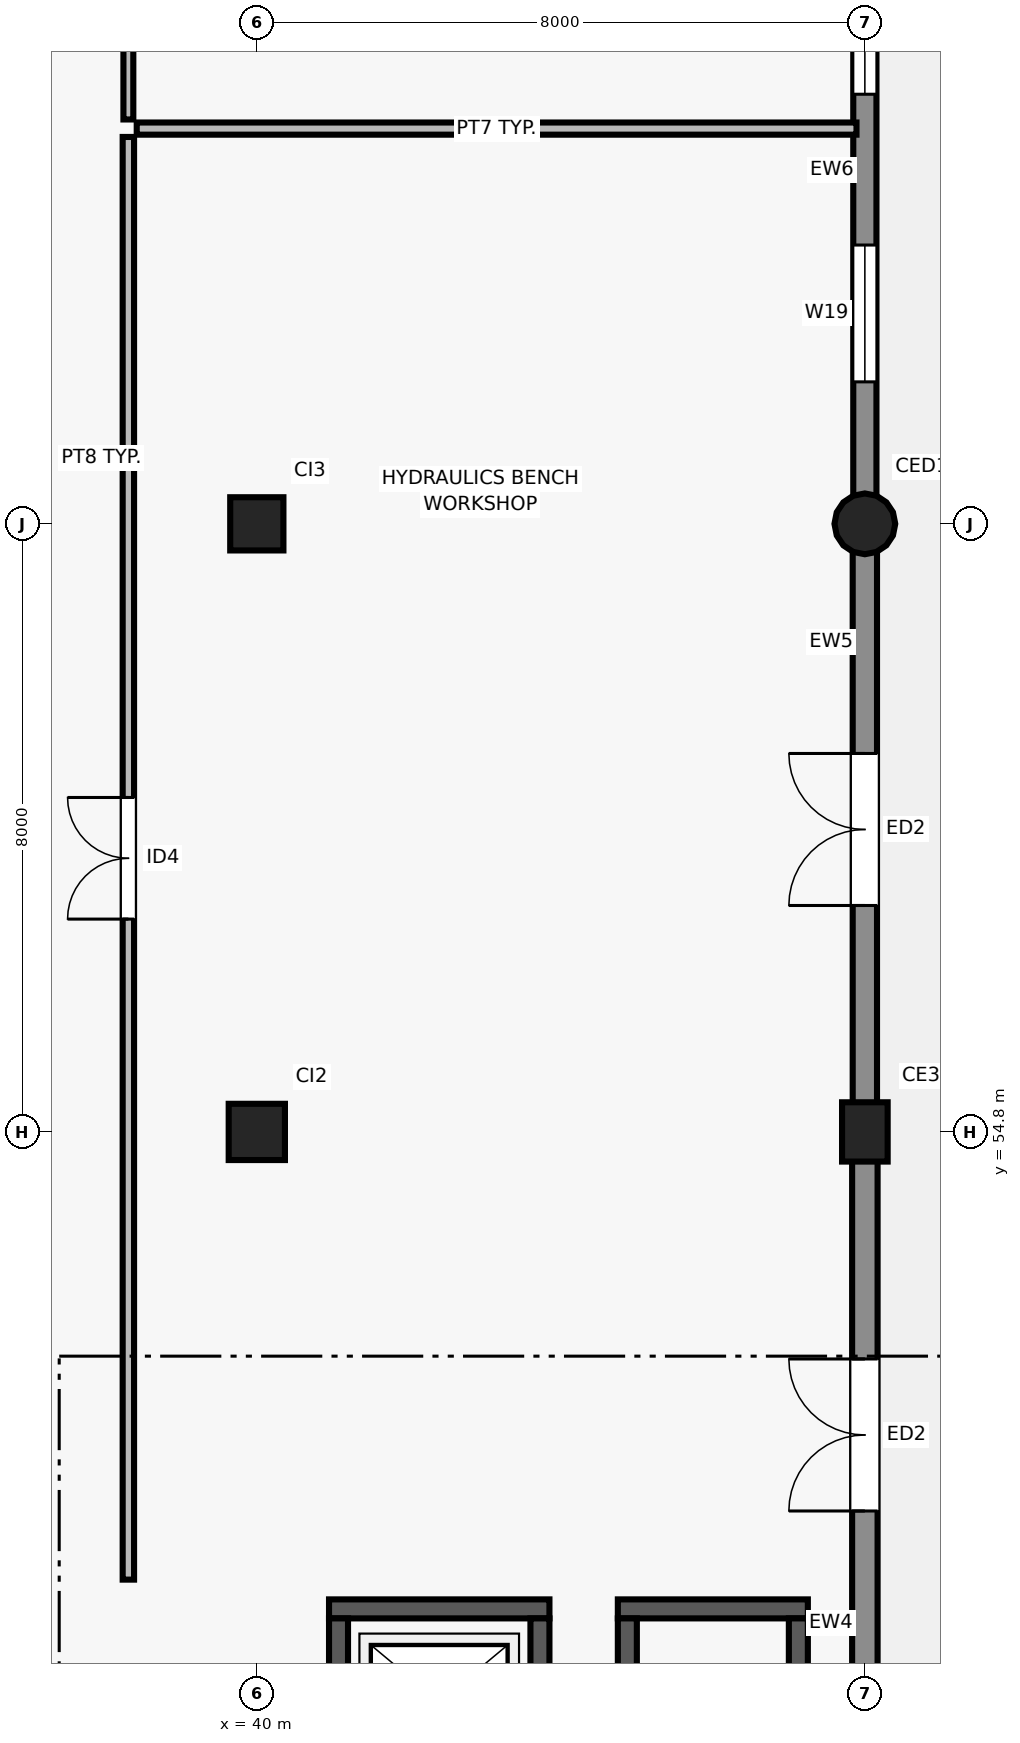
"""IFC4 building model, lengths in metres.
Left out: names, types, materials, properties, quantities, classifications, styles, units other than length and angle.
Written with IfcOpenShell. Run it as: python <this file> out.ifc"""

import sys

from ifc_helpers import new_model, si_unit, direction, frame, frame_2d, origin, origin_2d, place, context, subcontext, project, spatial, rectangle, circle, extrude, element, fill, save


model = new_model("IFC4")
c1 = context("Model", 3, precision=1e-05, world=origin(), true_north=direction((0.0, 1.0)))
c2 = subcontext(c1, "Body", "Model", "MODEL_VIEW")
j1 = project(units=[si_unit("LENGTHUNIT", "METRE"), si_unit("PLANEANGLEUNIT", "RADIAN")], contexts=[c1])
p1 = place(None, origin())
s1 = spatial("IfcSite", under=j1, at=p1, CompositionType="ELEMENT")
p2 = place(p1, origin())
s2 = spatial("IfcBuilding", under=s1, at=p2, CompositionType="ELEMENT")
p3 = place(p2, origin())
s3 = spatial("IfcBuildingStorey", under=s2, at=p3, CompositionType="ELEMENT", Elevation=0.0)
p4 = place(p3, frame((40.0, 54.8, 0.0), z_axis=(0.0, 0.0, 1.0), x_axis=(1.0, 0.0, 0.0)))
e1 = element("IfcColumn", 1, at=p4, inside=s3, PredefinedType="COLUMN", context=c2, shape_type="SweptSolid", body=[
    extrude(rectangle(XDim=0.74, YDim=0.74, at=origin_2d()), origin(), (0.0, 0.0, 1.0), 4.5),
])
p5 = place(p3, frame((40.0, 62.8, 0.0), z_axis=(0.0, 0.0, 1.0), x_axis=(1.0, 0.0, 0.0)))
e2 = element("IfcColumn", 2, at=p5, inside=s3, PredefinedType="COLUMN", context=c2, shape_type="SweptSolid", body=[
    extrude(rectangle(XDim=0.7, YDim=0.7, at=origin_2d()), origin(), (0.0, 0.0, 1.0), 4.5),
])
p6 = place(p3, frame((48.0, 54.8, 0.0), z_axis=(0.0, 0.0, 1.0), x_axis=(1.0, 0.0, 0.0)))
e3 = element("IfcColumn", 3, at=p6, inside=s3, PredefinedType="COLUMN", context=c2, shape_type="SweptSolid", body=[
    extrude(rectangle(XDim=0.78, YDim=0.6, at=origin_2d()), origin(), (0.0, 0.0, 1.0), 4.5),
])
p7 = place(p3, frame((48.0, 62.8, 0.0), z_axis=(0.0, 0.0, 1.0), x_axis=(1.0, 0.0, 0.0)))
e4 = element("IfcColumn", 4, at=p7, inside=s3, PredefinedType="COLUMN", context=c2, shape_type="SweptSolid", body=[
    extrude(circle(Radius=0.4, at=origin_2d()), origin(), (0.0, 0.0, 1.0), 4.5),
])
p8 = place(p3, frame((48.0, 47.12, 0.0), z_axis=(0.0, 0.0, 1.0), x_axis=(0.0, 1.0, 0.0)))
e5 = element("IfcWall", 5, at=p8, inside=s3, PredefinedType="SOLIDWALL", context=c2, shape_type="SweptSolid", body=[
    extrude(rectangle(XDim=7.385, YDim=0.335, at=frame_2d((3.692, 0.0))), origin(), (0.0, 0.0, 1.0), 3.6),
])
p9 = place(p8, frame((2.693, 0.0, 0.0)))
e6 = element("IfcOpeningElement", 6, at=p9, cuts=e5, PredefinedType="OPENING", context=c2, shape_type="SweptSolid", body=[
    extrude(rectangle(XDim=2.0, YDim=2.4, at=frame_2d((1.0, 1.2))), frame((0.0, 0.177, 0.0), z_axis=(0.0, -1.0, 0.0), x_axis=(1.0, 0.0, 0.0)), (0.0, 0.0, 1.0), 0.355),
])
p10 = place(p3, frame((48.0, 55.095, 0.0), z_axis=(0.0, 0.0, 1.0), x_axis=(0.0, 1.0, 0.0)))
e7 = element("IfcWall", 7, at=p10, inside=s3, PredefinedType="SOLIDWALL", context=c2, shape_type="SweptSolid", body=[
    extrude(rectangle(XDim=7.369, YDim=0.32, at=frame_2d((3.685, 0.0))), origin(), (0.0, 0.0, 1.0), 3.64),
])
p11 = place(p10, frame((2.684, 0.0, 0.0)))
e8 = element("IfcOpeningElement", 8, at=p11, cuts=e7, PredefinedType="OPENING", context=c2, shape_type="SweptSolid", body=[
    extrude(rectangle(XDim=2.0, YDim=2.4, at=frame_2d((1.0, 1.2))), frame((0.0, 0.17, 0.0), z_axis=(0.0, -1.0, 0.0), x_axis=(1.0, 0.0, 0.0)), (0.0, 0.0, 1.0), 0.34),
])
p12 = place(p3, frame((48.0, 63.136, 0.0), z_axis=(0.0, 0.0, 1.0), x_axis=(0.0, 1.0, 0.0)))
e9 = element("IfcWall", 9, at=p12, inside=s3, PredefinedType="SOLIDWALL", context=c2, shape_type="SweptSolid", body=[
    extrude(rectangle(XDim=7.269, YDim=0.305, at=frame_2d((3.635, 0.0))), origin(), (0.0, 0.0, 1.0), 3.7),
])
p13 = place(p12, frame((1.532, 0.0, 0.9)))
e10 = element("IfcOpeningElement", 10, at=p13, cuts=e9, PredefinedType="OPENING", context=c2, shape_type="SweptSolid", body=[
    extrude(rectangle(XDim=1.8, YDim=1.25, at=frame_2d((0.9, 0.625))), frame((0.0, 0.162, 0.0), z_axis=(0.0, -1.0, 0.0), x_axis=(1.0, 0.0, 0.0)), (0.0, 0.0, 1.0), 0.325),
])
p14 = place(p12, frame((5.316, 0.0, 0.9)))
e11 = element("IfcOpeningElement", 11, at=p14, cuts=e9, PredefinedType="OPENING", context=c2, shape_type="SweptSolid", body=[
    extrude(rectangle(XDim=1.5, YDim=1.25, at=frame_2d((0.75, 0.625))), frame((0.0, 0.162, 0.0), z_axis=(0.0, -1.0, 0.0), x_axis=(1.0, 0.0, 0.0)), (0.0, 0.0, 1.0), 0.325),
])
p15 = place(p3, frame((40.95, 48.525, 0.0), z_axis=(0.0, 0.0, 1.0), x_axis=(1.0, 0.0, 0.0)))
e12 = element("IfcWall", 12, at=p15, inside=s3, PredefinedType="SHEAR", context=c2, shape_type="SweptSolid", body=[
    extrude(rectangle(XDim=2.9, YDim=0.25, at=frame_2d((1.45, 0.0))), origin(), (0.0, 0.0, 1.0), 4.22),
])
for number, where, z_axis, x_axis in (
    (13, (41.075, 46.2, 0.0), (0.0, 0.0, 1.0), (0.0, 1.0, 0.0)),
    (14, (43.725, 46.2, 0.0), (0.0, 0.0, 1.0), (0.0, 1.0, 0.0)),
):
    element("IfcWall", number, at=place(p3, frame(where, z_axis=z_axis, x_axis=x_axis)), inside=s3, PredefinedType="SHEAR", context=c2, shape_type="SweptSolid", body=[
        extrude(rectangle(XDim=2.2, YDim=0.25, at=frame_2d((1.1, 0.0))), origin(), (0.0, 0.0, 1.0), 4.22),
    ])
p16 = place(p3, frame((44.75, 48.525, 0.0), z_axis=(0.0, 0.0, 1.0), x_axis=(1.0, 0.0, 0.0)))
e15 = element("IfcWall", 15, at=p16, inside=s3, PredefinedType="SHEAR", context=c2, shape_type="SweptSolid", body=[
    extrude(rectangle(XDim=2.5, YDim=0.25, at=frame_2d((1.25, 0.0))), origin(), (0.0, 0.0, 1.0), 4.22),
])
for number, where, z_axis, x_axis in (
    (16, (44.875, 46.2, 0.0), (0.0, 0.0, 1.0), (0.0, 1.0, 0.0)),
    (17, (47.125, 46.2, 0.0), (0.0, 0.0, 1.0), (0.0, 1.0, 0.0)),
):
    element("IfcWall", number, at=place(p3, frame(where, z_axis=z_axis, x_axis=x_axis)), inside=s3, PredefinedType="SHEAR", context=c2, shape_type="SweptSolid", body=[
        extrude(rectangle(XDim=2.2, YDim=0.25, at=frame_2d((1.1, 0.0))), origin(), (0.0, 0.0, 1.0), 4.22),
    ])
p17 = place(p3, frame((38.42, 68.0, 0.0), z_axis=(0.0, 0.0, 1.0), x_axis=(1.0, 0.0, 0.0)))
e18 = element("IfcWall", 18, at=p17, inside=s3, PredefinedType="PARTITIONING", context=c2, shape_type="SweptSolid", body=[
    extrude(rectangle(XDim=9.47, YDim=0.16, at=frame_2d((4.735, 0.0))), origin(), (0.0, 0.0, 1.0), 4.2),
])
p18 = place(p3, frame((38.31, 48.91, 0.0), z_axis=(0.0, 0.0, 1.0), x_axis=(0.0, 1.0, 0.0)))
e19 = element("IfcWall", 19, at=p18, inside=s3, PredefinedType="PARTITIONING", context=c2, shape_type="SweptSolid", body=[
    extrude(rectangle(XDim=18.98, YDim=0.15, at=frame_2d((9.49, 0.0))), origin(), (0.0, 0.0, 1.0), 4.2),
])
p19 = place(p18, frame((8.69, 0.0, 0.0)))
e20 = element("IfcOpeningElement", 20, at=p19, cuts=e19, PredefinedType="OPENING", context=c2, shape_type="SweptSolid", body=[
    extrude(rectangle(XDim=1.6, YDim=2.25, at=frame_2d((0.8, 1.125))), frame((0.0, 0.085, 0.0), z_axis=(0.0, -1.0, 0.0), x_axis=(1.0, 0.0, 0.0)), (0.0, 0.0, 1.0), 0.17),
])
p20 = place(p3, frame((38.31, 68.12, 0.0), z_axis=(0.0, 0.0, 1.0), x_axis=(0.0, 1.0, 0.0)))
e21 = element("IfcWall", 21, at=p20, inside=s3, PredefinedType="PARTITIONING", context=c2, shape_type="SweptSolid", body=[
    extrude(rectangle(XDim=19.77, YDim=0.13, at=frame_2d((9.885, 0.0))), origin(), (0.0, 0.0, 1.0), 4.2),
])
p21 = place(p20, frame((9.06, 0.0, 0.0)))
e22 = element("IfcOpeningElement", 22, at=p21, cuts=e21, PredefinedType="OPENING", context=c2, shape_type="SweptSolid", body=[
    extrude(rectangle(XDim=1.65, YDim=2.3, at=frame_2d((0.825, 1.15))), frame((0.0, 0.075, 0.0), z_axis=(0.0, -1.0, 0.0), x_axis=(1.0, 0.0, 0.0)), (0.0, 0.0, 1.0), 0.15),
])
p22 = place(p9, frame((2.0, 0.0, 0.0), z_axis=(0.0, 0.0, 1.0), x_axis=(-1.0, 0.0, 0.0)))
e23 = element("IfcDoor", 23, at=p22, inside=s3, OperationType="DOUBLE_DOOR_SINGLE_SWING", PredefinedType="DOOR", context=c2, shape_type="SweptSolid", body=[
    extrude(rectangle(XDim=2.0, YDim=2.4, at=frame_2d((1.0, 1.2))), frame((0.0, 0.025, 0.0), z_axis=(0.0, -1.0, 0.0), x_axis=(1.0, 0.0, 0.0)), (0.0, 0.0, 1.0), 0.05),
])
fill(e6, e23)
p23 = place(p11, frame((2.0, 0.0, 0.0), z_axis=(0.0, 0.0, 1.0), x_axis=(-1.0, 0.0, 0.0)))
e24 = element("IfcDoor", 24, at=p23, inside=s3, OperationType="DOUBLE_DOOR_SINGLE_SWING", PredefinedType="DOOR", context=c2, shape_type="SweptSolid", body=[
    extrude(rectangle(XDim=2.0, YDim=2.4, at=frame_2d((1.0, 1.2))), frame((0.0, 0.025, 0.0), z_axis=(0.0, -1.0, 0.0), x_axis=(1.0, 0.0, 0.0)), (0.0, 0.0, 1.0), 0.05),
])
fill(e8, e24)
p24 = place(p13, origin())
e25 = element("IfcWindow", 25, at=p24, inside=s3, PartitioningType="SINGLE_PANEL", PredefinedType="WINDOW", context=c2, shape_type="SweptSolid", body=[
    extrude(rectangle(XDim=1.8, YDim=1.25, at=frame_2d((0.9, 0.625))), frame((0.0, 0.03, 0.0), z_axis=(0.0, -1.0, 0.0), x_axis=(1.0, 0.0, 0.0)), (0.0, 0.0, 1.0), 0.06),
])
fill(e10, e25)
p25 = place(p14, origin())
e26 = element("IfcWindow", 26, at=p25, inside=s3, PartitioningType="SINGLE_PANEL", PredefinedType="WINDOW", context=c2, shape_type="SweptSolid", body=[
    extrude(rectangle(XDim=1.5, YDim=1.25, at=frame_2d((0.75, 0.625))), frame((0.0, 0.03, 0.0), z_axis=(0.0, -1.0, 0.0), x_axis=(1.0, 0.0, 0.0)), (0.0, 0.0, 1.0), 0.06),
])
fill(e11, e26)
p26 = place(p19, origin())
e27 = element("IfcDoor", 27, at=p26, inside=s3, OperationType="DOUBLE_DOOR_SINGLE_SWING", PredefinedType="DOOR", context=c2, shape_type="SweptSolid", body=[
    extrude(rectangle(XDim=1.6, YDim=2.25, at=frame_2d((0.8, 1.125))), frame((0.0, 0.025, 0.0), z_axis=(0.0, -1.0, 0.0), x_axis=(1.0, 0.0, 0.0)), (0.0, 0.0, 1.0), 0.05),
])
fill(e20, e27)
save(model, sys.argv[1])
